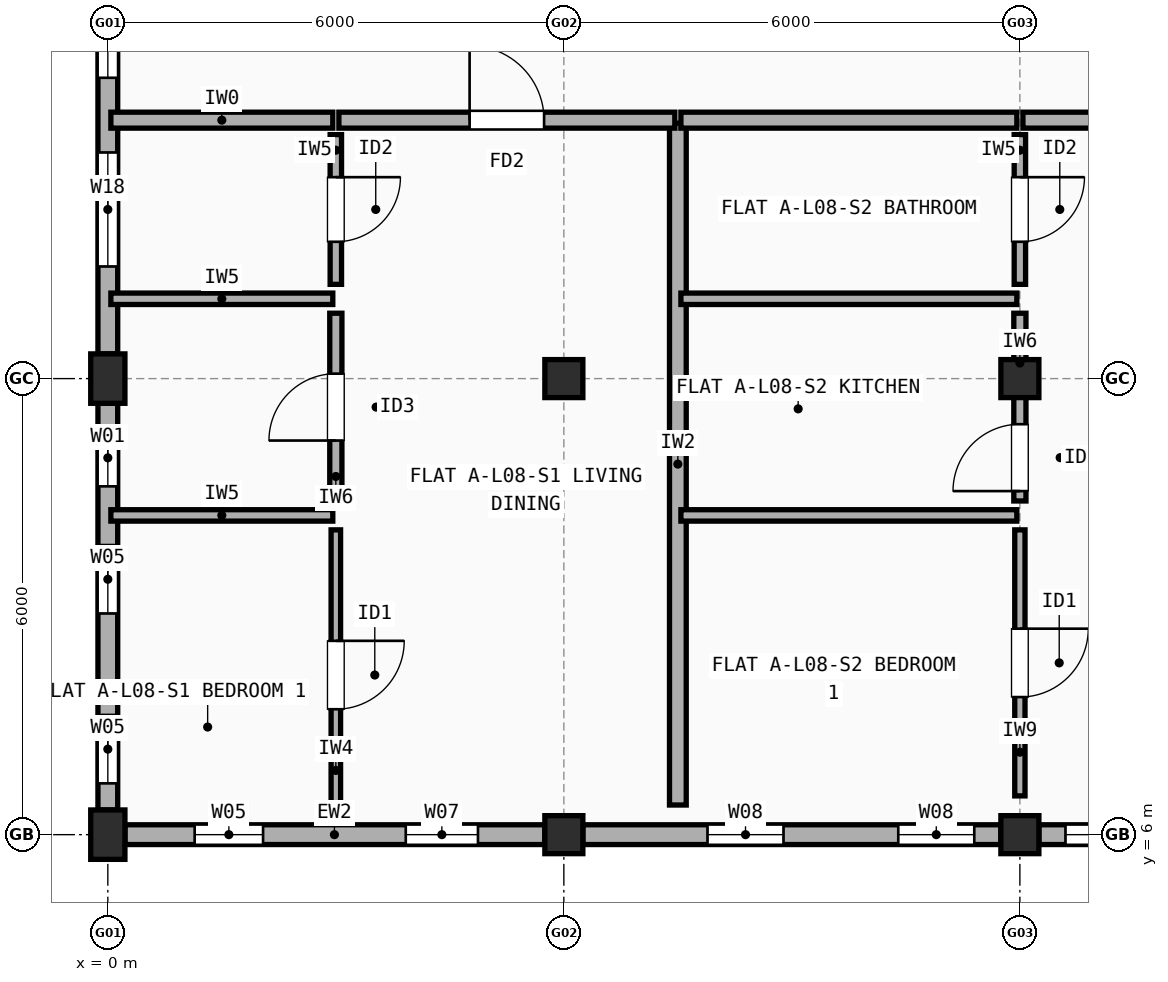
"""IFC4 building model, lengths in metres.
Left out: names, types, materials, properties, quantities, classifications, styles, units other than length and angle.
Written with IfcOpenShell. Run it as: python <this file> out.ifc"""

import sys

from ifc_helpers import new_model, si_unit, direction, frame, frame_2d, origin, origin_2d, place, context, subcontext, project, spatial, rectangle, extrude, element, fill, save


model = new_model("IFC4")
c1 = context("Model", 3, precision=1e-05, world=origin(), true_north=direction((0.0, 1.0)))
c2 = subcontext(c1, "Body", "Model", "MODEL_VIEW")
j1 = project(units=[si_unit("LENGTHUNIT", "METRE"), si_unit("PLANEANGLEUNIT", "RADIAN")], contexts=[c1])
p1 = place(None, origin())
s1 = spatial("IfcSite", under=j1, at=p1, CompositionType="ELEMENT")
p2 = place(p1, origin())
s2 = spatial("IfcBuilding", under=s1, at=p2, CompositionType="ELEMENT")
p3 = place(p2, frame((0.0, 0.0, 26.9)))
s3 = spatial("IfcBuildingStorey", under=s2, at=p3, CompositionType="ELEMENT", Elevation=26.9)
for number, where, z_axis, x_axis in (
    (1, (0.0, 6.0, 0.0), (0.0, 0.0, 1.0), (1.0, 0.0, 0.0)),
    (2, (0.0, 12.0, 0.0), (0.0, 0.0, 1.0), (1.0, 0.0, 0.0)),
):
    element("IfcColumn", number, at=place(p3, frame(where, z_axis=z_axis, x_axis=x_axis)), inside=s3, PredefinedType="COLUMN", context=c2, shape_type="SweptSolid", body=[
        extrude(rectangle(XDim=0.45, YDim=0.65, at=origin_2d()), origin(), (0.0, 0.0, 1.0), 2.98),
    ])
for number, where, z_axis, x_axis in (
    (3, (6.0, 6.0, 0.0), (0.0, 0.0, 1.0), (1.0, 0.0, 0.0)),
    (4, (6.0, 12.0, 0.0), (0.0, 0.0, 1.0), (1.0, 0.0, 0.0)),
    (5, (12.0, 6.0, 0.0), (0.0, 0.0, 1.0), (1.0, 0.0, 0.0)),
    (6, (12.0, 12.0, 0.0), (0.0, 0.0, 1.0), (1.0, 0.0, 0.0)),
):
    element("IfcColumn", number, at=place(p3, frame(where, z_axis=z_axis, x_axis=x_axis)), inside=s3, PredefinedType="COLUMN", context=c2, shape_type="SweptSolid", body=[
        extrude(rectangle(XDim=0.5, YDim=0.5, at=origin_2d()), origin(), (0.0, 0.0, 1.0), 2.98),
    ])
p4 = place(p3, frame((0.225, 6.0, 0.0), z_axis=(0.0, 0.0, 1.0), x_axis=(1.0, 0.0, 0.0)))
e7 = element("IfcWall", 7, at=p4, inside=s3, PredefinedType="STANDARD", context=c2, shape_type="SweptSolid", body=[
    extrude(rectangle(XDim=5.525, YDim=0.26, at=frame_2d((2.762, 0.0))), origin(), (0.0, 0.0, 1.0), 2.462),
])
p5 = place(p4, frame((0.917, 0.0, 0.9)))
e8 = element("IfcOpeningElement", 8, at=p5, cuts=e7, PredefinedType="OPENING", context=c2, shape_type="SweptSolid", body=[
    extrude(rectangle(XDim=0.9, YDim=1.4, at=frame_2d((0.45, 0.7))), frame((0.0, 0.14, 0.0), z_axis=(0.0, -1.0, 0.0), x_axis=(1.0, 0.0, 0.0)), (0.0, 0.0, 1.0), 0.28),
])
p6 = place(p4, frame((3.695, 0.0, 0.9)))
e9 = element("IfcOpeningElement", 9, at=p6, cuts=e7, PredefinedType="OPENING", context=c2, shape_type="SweptSolid", body=[
    extrude(rectangle(XDim=0.95, YDim=1.35, at=frame_2d((0.475, 0.675))), frame((0.0, 0.14, 0.0), z_axis=(0.0, -1.0, 0.0), x_axis=(1.0, 0.0, 0.0)), (0.0, 0.0, 1.0), 0.28),
])
p7 = place(p3, frame((6.25, 6.0, 0.0), z_axis=(0.0, 0.0, 1.0), x_axis=(1.0, 0.0, 0.0)))
e10 = element("IfcWall", 10, at=p7, inside=s3, PredefinedType="STANDARD", context=c2, shape_type="SweptSolid", body=[
    extrude(rectangle(XDim=5.5, YDim=0.26, at=frame_2d((2.75, 0.0))), origin(), (0.0, 0.0, 1.0), 2.462),
])
p8 = place(p7, frame((1.64, 0.0, 0.9)))
e11 = element("IfcOpeningElement", 11, at=p8, cuts=e10, PredefinedType="OPENING", context=c2, shape_type="SweptSolid", body=[
    extrude(rectangle(XDim=1.0, YDim=1.4, at=frame_2d((0.5, 0.7))), frame((0.0, 0.14, 0.0), z_axis=(0.0, -1.0, 0.0), x_axis=(1.0, 0.0, 0.0)), (0.0, 0.0, 1.0), 0.28),
])
p9 = place(p7, frame((4.15, 0.0, 0.9)))
e12 = element("IfcOpeningElement", 12, at=p9, cuts=e10, PredefinedType="OPENING", context=c2, shape_type="SweptSolid", body=[
    extrude(rectangle(XDim=1.0, YDim=1.4, at=frame_2d((0.5, 0.7))), frame((0.0, 0.14, 0.0), z_axis=(0.0, -1.0, 0.0), x_axis=(1.0, 0.0, 0.0)), (0.0, 0.0, 1.0), 0.28),
])
p10 = place(p3, frame((12.25, 6.0, 0.0), z_axis=(0.0, 0.0, 1.0), x_axis=(1.0, 0.0, 0.0)))
e13 = element("IfcWall", 13, at=p10, inside=s3, PredefinedType="STANDARD", context=c2, shape_type="SweptSolid", body=[
    extrude(rectangle(XDim=5.5, YDim=0.26, at=frame_2d((2.75, 0.0))), origin(), (0.0, 0.0, 1.0), 2.462),
])
p11 = place(p10, frame((0.35, 0.0, 0.9)))
e14 = element("IfcOpeningElement", 14, at=p11, cuts=e13, PredefinedType="OPENING", context=c2, shape_type="SweptSolid", body=[
    extrude(rectangle(XDim=1.2, YDim=1.35, at=frame_2d((0.6, 0.675))), frame((0.0, 0.14, 0.0), z_axis=(0.0, -1.0, 0.0), x_axis=(1.0, 0.0, 0.0)), (0.0, 0.0, 1.0), 0.28),
])
p12 = place(p10, frame((3.95, 0.0, 0.9)))
e15 = element("IfcOpeningElement", 15, at=p12, cuts=e13, PredefinedType="OPENING", context=c2, shape_type="SweptSolid", body=[
    extrude(rectangle(XDim=1.2, YDim=1.35, at=frame_2d((0.6, 0.675))), frame((0.0, 0.14, 0.0), z_axis=(0.0, -1.0, 0.0), x_axis=(1.0, 0.0, 0.0)), (0.0, 0.0, 1.0), 0.28),
])
p13 = place(p3, frame((0.0, 17.675, 0.0), z_axis=(0.0, 0.0, 1.0), x_axis=(0.0, -1.0, 0.0)))
e16 = element("IfcWall", 16, at=p13, inside=s3, PredefinedType="STANDARD", context=c2, shape_type="SweptSolid", body=[
    extrude(rectangle(XDim=5.35, YDim=0.26, at=frame_2d((2.675, 0.0))), origin(), (0.0, 0.0, 1.0), 2.462),
])
p14 = place(p13, frame((0.518, 0.0, 0.9)))
e17 = element("IfcOpeningElement", 17, at=p14, cuts=e16, PredefinedType="OPENING", context=c2, shape_type="SweptSolid", body=[
    extrude(rectangle(XDim=1.2, YDim=1.35, at=frame_2d((0.6, 0.675))), frame((0.0, 0.14, 0.0), z_axis=(0.0, -1.0, 0.0), x_axis=(1.0, 0.0, 0.0)), (0.0, 0.0, 1.0), 0.28),
])
p15 = place(p13, frame((2.7, 0.0, 0.9)))
e18 = element("IfcOpeningElement", 18, at=p15, cuts=e16, PredefinedType="OPENING", context=c2, shape_type="SweptSolid", body=[
    extrude(rectangle(XDim=1.5, YDim=1.4, at=frame_2d((0.75, 0.7))), frame((0.0, 0.14, 0.0), z_axis=(0.0, -1.0, 0.0), x_axis=(1.0, 0.0, 0.0)), (0.0, 0.0, 1.0), 0.28),
])
p16 = place(p3, frame((0.0, 11.675, 0.0), z_axis=(0.0, 0.0, 1.0), x_axis=(0.0, -1.0, 0.0)))
e19 = element("IfcWall", 19, at=p16, inside=s3, PredefinedType="STANDARD", context=c2, shape_type="SweptSolid", body=[
    extrude(rectangle(XDim=5.35, YDim=0.26, at=frame_2d((2.675, 0.0))), origin(), (0.0, 0.0, 1.0), 2.462),
])
p17 = place(p16, frame((0.343, 0.0, 0.9)))
e20 = element("IfcOpeningElement", 20, at=p17, cuts=e19, PredefinedType="OPENING", context=c2, shape_type="SweptSolid", body=[
    extrude(rectangle(XDim=0.75, YDim=1.15, at=frame_2d((0.375, 0.575))), frame((0.0, 0.14, 0.0), z_axis=(0.0, -1.0, 0.0), x_axis=(1.0, 0.0, 0.0)), (0.0, 0.0, 1.0), 0.28),
])
p18 = place(p16, frame((1.865, 0.0, 0.9)))
e21 = element("IfcOpeningElement", 21, at=p18, cuts=e19, PredefinedType="OPENING", context=c2, shape_type="SweptSolid", body=[
    extrude(rectangle(XDim=0.9, YDim=1.4, at=frame_2d((0.45, 0.7))), frame((0.0, 0.14, 0.0), z_axis=(0.0, -1.0, 0.0), x_axis=(1.0, 0.0, 0.0)), (0.0, 0.0, 1.0), 0.28),
])
p19 = place(p16, frame((4.1, 0.0, 0.9)))
e22 = element("IfcOpeningElement", 22, at=p19, cuts=e19, PredefinedType="OPENING", context=c2, shape_type="SweptSolid", body=[
    extrude(rectangle(XDim=0.9, YDim=1.4, at=frame_2d((0.45, 0.7))), frame((0.0, 0.14, 0.0), z_axis=(0.0, -1.0, 0.0), x_axis=(1.0, 0.0, 0.0)), (0.0, 0.0, 1.0), 0.28),
])
p20 = place(p3, frame((7.5, 6.39, 0.0), z_axis=(0.0, 0.0, 1.0), x_axis=(0.0, 1.0, 0.0)))
e23 = element("IfcWall", 23, at=p20, inside=s3, PredefinedType="SOLIDWALL", context=c2, shape_type="SweptSolid", body=[
    extrude(rectangle(XDim=8.97, YDim=0.22, at=frame_2d((4.485, 0.0))), origin(), (0.0, 0.0, 1.0), 2.408),
])
p21 = place(p3, frame((0.04, 15.4, 0.0), z_axis=(0.0, 0.0, 1.0), x_axis=(1.0, 0.0, 0.0)))
e24 = element("IfcWall", 24, at=p21, inside=s3, PredefinedType="SOLIDWALL", context=c2, shape_type="SweptSolid", body=[
    extrude(rectangle(XDim=2.92, YDim=0.21, at=frame_2d((1.46, 0.0))), origin(), (0.0, 0.0, 1.0), 2.462),
])
p22 = place(p3, frame((3.04, 15.4, 0.0), z_axis=(0.0, 0.0, 1.0), x_axis=(1.0, 0.0, 0.0)))
e25 = element("IfcWall", 25, at=p22, inside=s3, PredefinedType="SOLIDWALL", context=c2, shape_type="SweptSolid", body=[
    extrude(rectangle(XDim=4.42, YDim=0.21, at=frame_2d((2.21, 0.0))), origin(), (0.0, 0.0, 1.0), 2.548),
])
p23 = place(p22, frame((1.72, 0.0, 0.0)))
e26 = element("IfcOpeningElement", 26, at=p23, cuts=e25, PredefinedType="OPENING", context=c2, shape_type="SweptSolid", body=[
    extrude(rectangle(XDim=0.98, YDim=2.15, at=frame_2d((0.49, 1.075))), frame((0.0, 0.115, 0.0), z_axis=(0.0, -1.0, 0.0), x_axis=(1.0, 0.0, 0.0)), (0.0, 0.0, 1.0), 0.23),
])
p24 = place(p3, frame((3.0, 6.19, 0.0), z_axis=(0.0, 0.0, 1.0), x_axis=(0.0, 1.0, 0.0)))
e27 = element("IfcWall", 27, at=p24, inside=s3, PredefinedType="PARTITIONING", context=c2, shape_type="SweptSolid", body=[
    extrude(rectangle(XDim=3.82, YDim=0.125, at=frame_2d((1.91, 0.0))), origin(), (0.0, 0.0, 1.0), 2.98),
])
p25 = place(p24, frame((1.46, 0.0, 0.0)))
e28 = element("IfcOpeningElement", 28, at=p25, cuts=e27, PredefinedType="OPENING", context=c2, shape_type="SweptSolid", body=[
    extrude(rectangle(XDim=0.9, YDim=2.1, at=frame_2d((0.45, 1.05))), frame((0.0, 0.073, 0.0), z_axis=(0.0, -1.0, 0.0), x_axis=(1.0, 0.0, 0.0)), (0.0, 0.0, 1.0), 0.145),
])
p26 = place(p3, frame((3.0, 10.39, 0.0), z_axis=(0.0, 0.0, 1.0), x_axis=(0.0, 1.0, 0.0)))
e29 = element("IfcWall", 29, at=p26, inside=s3, PredefinedType="PLUMBINGWALL", context=c2, shape_type="SweptSolid", body=[
    extrude(rectangle(XDim=2.47, YDim=0.16, at=frame_2d((1.235, 0.0))), origin(), (0.0, 0.0, 1.0), 2.508),
])
p27 = place(p26, frame((0.795, 0.0, 0.0)))
e30 = element("IfcOpeningElement", 30, at=p27, cuts=e29, PredefinedType="OPENING", context=c2, shape_type="SweptSolid", body=[
    extrude(rectangle(XDim=0.88, YDim=2.1, at=frame_2d((0.44, 1.05))), frame((0.0, 0.09, 0.0), z_axis=(0.0, -1.0, 0.0), x_axis=(1.0, 0.0, 0.0)), (0.0, 0.0, 1.0), 0.18),
])
p28 = place(p3, frame((3.0, 13.24, 0.0), z_axis=(0.0, 0.0, 1.0), x_axis=(0.0, 1.0, 0.0)))
e31 = element("IfcWall", 31, at=p28, inside=s3, PredefinedType="PARTITIONING", context=c2, shape_type="SweptSolid", body=[
    extrude(rectangle(XDim=1.97, YDim=0.15, at=frame_2d((0.985, 0.0))), origin(), (0.0, 0.0, 1.0), 2.98),
])
p29 = place(p28, frame((0.56, 0.0, 0.0)))
e32 = element("IfcOpeningElement", 32, at=p29, cuts=e31, PredefinedType="OPENING", context=c2, shape_type="SweptSolid", body=[
    extrude(rectangle(XDim=0.85, YDim=2.1, at=frame_2d((0.425, 1.05))), frame((0.0, 0.085, 0.0), z_axis=(0.0, -1.0, 0.0), x_axis=(1.0, 0.0, 0.0)), (0.0, 0.0, 1.0), 0.17),
])
for number, where, z_axis, x_axis in (
    (33, (0.04, 10.2, 0.0), (0.0, 0.0, 1.0), (1.0, 0.0, 0.0)),
    (34, (0.04, 13.05, 0.0), (0.0, 0.0, 1.0), (1.0, 0.0, 0.0)),
):
    element("IfcWall", number, at=place(p3, frame(where, z_axis=z_axis, x_axis=x_axis)), inside=s3, PredefinedType="PARTITIONING", context=c2, shape_type="SweptSolid", body=[
        extrude(rectangle(XDim=2.92, YDim=0.15, at=frame_2d((1.46, 0.0))), origin(), (0.0, 0.0, 1.0), 2.462),
    ])
p30 = place(p3, frame((7.54, 15.4, 0.0), z_axis=(0.0, 0.0, 1.0), x_axis=(1.0, 0.0, 0.0)))
e35 = element("IfcWall", 35, at=p30, inside=s3, PredefinedType="SOLIDWALL", context=c2, shape_type="SweptSolid", body=[
    extrude(rectangle(XDim=4.42, YDim=0.21, at=frame_2d((2.21, 0.0))), origin(), (0.0, 0.0, 1.0), 2.548),
])
p31 = place(p3, frame((12.04, 15.4, 0.0), z_axis=(0.0, 0.0, 1.0), x_axis=(1.0, 0.0, 0.0)))
e36 = element("IfcWall", 36, at=p31, inside=s3, PredefinedType="SOLIDWALL", context=c2, shape_type="SweptSolid", body=[
    extrude(rectangle(XDim=5.92, YDim=0.21, at=frame_2d((2.96, 0.0))), origin(), (0.0, 0.0, 1.0), 2.508),
])
p32 = place(p31, frame((2.435, 0.0, 0.0)))
e37 = element("IfcOpeningElement", 37, at=p32, cuts=e36, PredefinedType="OPENING", context=c2, shape_type="SweptSolid", body=[
    extrude(rectangle(XDim=1.05, YDim=2.15, at=frame_2d((0.525, 1.075))), frame((0.0, 0.115, 0.0), z_axis=(0.0, -1.0, 0.0), x_axis=(1.0, 0.0, 0.0)), (0.0, 0.0, 1.0), 0.23),
])
p33 = place(p3, frame((12.0, 6.51, 0.0), z_axis=(0.0, 0.0, 1.0), x_axis=(0.0, 1.0, 0.0)))
e38 = element("IfcWall", 38, at=p33, inside=s3, PredefinedType="PARTITIONING", context=c2, shape_type="SweptSolid", body=[
    extrude(rectangle(XDim=3.5, YDim=0.135, at=frame_2d((1.75, 0.0))), origin(), (0.0, 0.0, 1.0), 2.458),
])
p34 = place(p33, frame((1.3, 0.0, 0.0)))
e39 = element("IfcOpeningElement", 39, at=p34, cuts=e38, PredefinedType="OPENING", context=c2, shape_type="SweptSolid", body=[
    extrude(rectangle(XDim=0.9, YDim=2.1, at=frame_2d((0.45, 1.05))), frame((0.0, 0.077, 0.0), z_axis=(0.0, -1.0, 0.0), x_axis=(1.0, 0.0, 0.0)), (0.0, 0.0, 1.0), 0.155),
])
p35 = place(p3, frame((12.0, 10.39, 0.0), z_axis=(0.0, 0.0, 1.0), x_axis=(0.0, 1.0, 0.0)))
e40 = element("IfcWall", 40, at=p35, inside=s3, PredefinedType="PLUMBINGWALL", context=c2, shape_type="SweptSolid", body=[
    extrude(rectangle(XDim=2.47, YDim=0.16, at=frame_2d((1.235, 0.0))), origin(), (0.0, 0.0, 1.0), 2.458),
])
p36 = place(p35, frame((0.13, 0.0, 0.0)))
e41 = element("IfcOpeningElement", 41, at=p36, cuts=e40, PredefinedType="OPENING", context=c2, shape_type="SweptSolid", body=[
    extrude(rectangle(XDim=0.88, YDim=2.1, at=frame_2d((0.44, 1.05))), frame((0.0, 0.09, 0.0), z_axis=(0.0, -1.0, 0.0), x_axis=(1.0, 0.0, 0.0)), (0.0, 0.0, 1.0), 0.18),
])
p37 = place(p3, frame((12.0, 13.24, 0.0), z_axis=(0.0, 0.0, 1.0), x_axis=(0.0, 1.0, 0.0)))
e42 = element("IfcWall", 42, at=p37, inside=s3, PredefinedType="PARTITIONING", context=c2, shape_type="SweptSolid", body=[
    extrude(rectangle(XDim=1.97, YDim=0.15, at=frame_2d((0.985, 0.0))), origin(), (0.0, 0.0, 1.0), 2.548),
])
p38 = place(p37, frame((0.56, 0.0, 0.0)))
e43 = element("IfcOpeningElement", 43, at=p38, cuts=e42, PredefinedType="OPENING", context=c2, shape_type="SweptSolid", body=[
    extrude(rectangle(XDim=0.85, YDim=2.1, at=frame_2d((0.425, 1.05))), frame((0.0, 0.085, 0.0), z_axis=(0.0, -1.0, 0.0), x_axis=(1.0, 0.0, 0.0)), (0.0, 0.0, 1.0), 0.17),
])
p39 = place(p3, frame((7.54, 10.2, 0.0), z_axis=(0.0, 0.0, 1.0), x_axis=(1.0, 0.0, 0.0)))
e44 = element("IfcWall", 44, at=p39, inside=s3, PredefinedType="PARTITIONING", context=c2, shape_type="SweptSolid", body=[
    extrude(rectangle(XDim=4.42, YDim=0.15, at=frame_2d((2.21, 0.0))), origin(), (0.0, 0.0, 1.0), 2.458),
])
p40 = place(p3, frame((7.54, 13.05, 0.0), z_axis=(0.0, 0.0, 1.0), x_axis=(1.0, 0.0, 0.0)))
e45 = element("IfcWall", 45, at=p40, inside=s3, PredefinedType="PARTITIONING", context=c2, shape_type="SweptSolid", body=[
    extrude(rectangle(XDim=4.42, YDim=0.15, at=frame_2d((2.21, 0.0))), origin(), (0.0, 0.0, 1.0), 2.548),
])
p41 = place(p5, origin())
e46 = element("IfcWindow", 46, at=p41, inside=s3, PartitioningType="SINGLE_PANEL", PredefinedType="WINDOW", context=c2, shape_type="SweptSolid", body=[
    extrude(rectangle(XDim=0.9, YDim=1.4, at=frame_2d((0.45, 0.7))), frame((0.0, 0.03, 0.0), z_axis=(0.0, -1.0, 0.0), x_axis=(1.0, 0.0, 0.0)), (0.0, 0.0, 1.0), 0.06),
])
fill(e8, e46)
p42 = place(p6, origin())
e47 = element("IfcWindow", 47, at=p42, inside=s3, PartitioningType="SINGLE_PANEL", PredefinedType="WINDOW", context=c2, shape_type="SweptSolid", body=[
    extrude(rectangle(XDim=0.95, YDim=1.35, at=frame_2d((0.475, 0.675))), frame((0.0, 0.03, 0.0), z_axis=(0.0, -1.0, 0.0), x_axis=(1.0, 0.0, 0.0)), (0.0, 0.0, 1.0), 0.06),
])
fill(e9, e47)
p43 = place(p8, origin())
e48 = element("IfcWindow", 48, at=p43, inside=s3, PartitioningType="SINGLE_PANEL", PredefinedType="WINDOW", context=c2, shape_type="SweptSolid", body=[
    extrude(rectangle(XDim=1.0, YDim=1.4, at=frame_2d((0.5, 0.7))), frame((0.0, 0.03, 0.0), z_axis=(0.0, -1.0, 0.0), x_axis=(1.0, 0.0, 0.0)), (0.0, 0.0, 1.0), 0.06),
])
fill(e11, e48)
p44 = place(p9, origin())
e49 = element("IfcWindow", 49, at=p44, inside=s3, PartitioningType="SINGLE_PANEL", PredefinedType="WINDOW", context=c2, shape_type="SweptSolid", body=[
    extrude(rectangle(XDim=1.0, YDim=1.4, at=frame_2d((0.5, 0.7))), frame((0.0, 0.03, 0.0), z_axis=(0.0, -1.0, 0.0), x_axis=(1.0, 0.0, 0.0)), (0.0, 0.0, 1.0), 0.06),
])
fill(e12, e49)
p45 = place(p11, origin())
e50 = element("IfcWindow", 50, at=p45, inside=s3, PartitioningType="SINGLE_PANEL", PredefinedType="WINDOW", context=c2, shape_type="SweptSolid", body=[
    extrude(rectangle(XDim=1.2, YDim=1.35, at=frame_2d((0.6, 0.675))), frame((0.0, 0.03, 0.0), z_axis=(0.0, -1.0, 0.0), x_axis=(1.0, 0.0, 0.0)), (0.0, 0.0, 1.0), 0.06),
])
fill(e14, e50)
p46 = place(p14, origin())
e51 = element("IfcWindow", 51, at=p46, inside=s3, PartitioningType="SINGLE_PANEL", PredefinedType="WINDOW", context=c2, shape_type="SweptSolid", body=[
    extrude(rectangle(XDim=1.2, YDim=1.35, at=frame_2d((0.6, 0.675))), frame((0.0, 0.03, 0.0), z_axis=(0.0, -1.0, 0.0), x_axis=(1.0, 0.0, 0.0)), (0.0, 0.0, 1.0), 0.06),
])
fill(e17, e51)
p47 = place(p15, origin())
e52 = element("IfcWindow", 52, at=p47, inside=s3, PartitioningType="SINGLE_PANEL", PredefinedType="WINDOW", context=c2, shape_type="SweptSolid", body=[
    extrude(rectangle(XDim=1.5, YDim=1.4, at=frame_2d((0.75, 0.7))), frame((0.0, 0.03, 0.0), z_axis=(0.0, -1.0, 0.0), x_axis=(1.0, 0.0, 0.0)), (0.0, 0.0, 1.0), 0.06),
])
fill(e18, e52)
p48 = place(p17, origin())
e53 = element("IfcWindow", 53, at=p48, inside=s3, PartitioningType="SINGLE_PANEL", PredefinedType="WINDOW", context=c2, shape_type="SweptSolid", body=[
    extrude(rectangle(XDim=0.75, YDim=1.15, at=frame_2d((0.375, 0.575))), frame((0.0, 0.03, 0.0), z_axis=(0.0, -1.0, 0.0), x_axis=(1.0, 0.0, 0.0)), (0.0, 0.0, 1.0), 0.06),
])
fill(e20, e53)
p49 = place(p18, origin())
e54 = element("IfcWindow", 54, at=p49, inside=s3, PartitioningType="SINGLE_PANEL", PredefinedType="WINDOW", context=c2, shape_type="SweptSolid", body=[
    extrude(rectangle(XDim=0.9, YDim=1.4, at=frame_2d((0.45, 0.7))), frame((0.0, 0.03, 0.0), z_axis=(0.0, -1.0, 0.0), x_axis=(1.0, 0.0, 0.0)), (0.0, 0.0, 1.0), 0.06),
])
fill(e21, e54)
p50 = place(p19, origin())
e55 = element("IfcWindow", 55, at=p50, inside=s3, PartitioningType="SINGLE_PANEL", PredefinedType="WINDOW", context=c2, shape_type="SweptSolid", body=[
    extrude(rectangle(XDim=0.9, YDim=1.4, at=frame_2d((0.45, 0.7))), frame((0.0, 0.03, 0.0), z_axis=(0.0, -1.0, 0.0), x_axis=(1.0, 0.0, 0.0)), (0.0, 0.0, 1.0), 0.06),
])
fill(e22, e55)
p51 = place(p23, origin())
e56 = element("IfcDoor", 56, at=p51, inside=s3, OperationType="SINGLE_SWING_LEFT", PredefinedType="DOOR", context=c2, shape_type="SweptSolid", body=[
    extrude(rectangle(XDim=0.98, YDim=2.15, at=frame_2d((0.49, 1.075))), frame((0.0, 0.025, 0.0), z_axis=(0.0, -1.0, 0.0), x_axis=(1.0, 0.0, 0.0)), (0.0, 0.0, 1.0), 0.05),
])
fill(e26, e56)
p52 = place(p25, origin())
e57 = element("IfcDoor", 57, at=p52, inside=s3, OperationType="SINGLE_SWING_RIGHT", PredefinedType="DOOR", context=c2, shape_type="SweptSolid", body=[
    extrude(rectangle(XDim=0.9, YDim=2.1, at=frame_2d((0.45, 1.05))), frame((0.0, 0.025, 0.0), z_axis=(0.0, -1.0, 0.0), x_axis=(1.0, 0.0, 0.0)), (0.0, 0.0, 1.0), 0.05),
])
fill(e28, e57)
p53 = place(p27, origin())
e58 = element("IfcDoor", 58, at=p53, inside=s3, OperationType="SINGLE_SWING_LEFT", PredefinedType="DOOR", context=c2, shape_type="SweptSolid", body=[
    extrude(rectangle(XDim=0.88, YDim=2.1, at=frame_2d((0.44, 1.05))), frame((0.0, 0.025, 0.0), z_axis=(0.0, -1.0, 0.0), x_axis=(1.0, 0.0, 0.0)), (0.0, 0.0, 1.0), 0.05),
])
fill(e30, e58)
p54 = place(p29, origin())
e59 = element("IfcDoor", 59, at=p54, inside=s3, OperationType="SINGLE_SWING_RIGHT", PredefinedType="DOOR", context=c2, shape_type="SweptSolid", body=[
    extrude(rectangle(XDim=0.85, YDim=2.1, at=frame_2d((0.425, 1.05))), frame((0.0, 0.025, 0.0), z_axis=(0.0, -1.0, 0.0), x_axis=(1.0, 0.0, 0.0)), (0.0, 0.0, 1.0), 0.05),
])
fill(e32, e59)
p55 = place(p34, origin())
e60 = element("IfcDoor", 60, at=p55, inside=s3, OperationType="SINGLE_SWING_RIGHT", PredefinedType="DOOR", context=c2, shape_type="SweptSolid", body=[
    extrude(rectangle(XDim=0.9, YDim=2.1, at=frame_2d((0.45, 1.05))), frame((0.0, 0.025, 0.0), z_axis=(0.0, -1.0, 0.0), x_axis=(1.0, 0.0, 0.0)), (0.0, 0.0, 1.0), 0.05),
])
fill(e39, e60)
p56 = place(p36, origin())
e61 = element("IfcDoor", 61, at=p56, inside=s3, OperationType="SINGLE_SWING_LEFT", PredefinedType="DOOR", context=c2, shape_type="SweptSolid", body=[
    extrude(rectangle(XDim=0.88, YDim=2.1, at=frame_2d((0.44, 1.05))), frame((0.0, 0.025, 0.0), z_axis=(0.0, -1.0, 0.0), x_axis=(1.0, 0.0, 0.0)), (0.0, 0.0, 1.0), 0.05),
])
fill(e41, e61)
p57 = place(p38, origin())
e62 = element("IfcDoor", 62, at=p57, inside=s3, OperationType="SINGLE_SWING_RIGHT", PredefinedType="DOOR", context=c2, shape_type="SweptSolid", body=[
    extrude(rectangle(XDim=0.85, YDim=2.1, at=frame_2d((0.425, 1.05))), frame((0.0, 0.025, 0.0), z_axis=(0.0, -1.0, 0.0), x_axis=(1.0, 0.0, 0.0)), (0.0, 0.0, 1.0), 0.05),
])
fill(e43, e62)
save(model, sys.argv[1])
